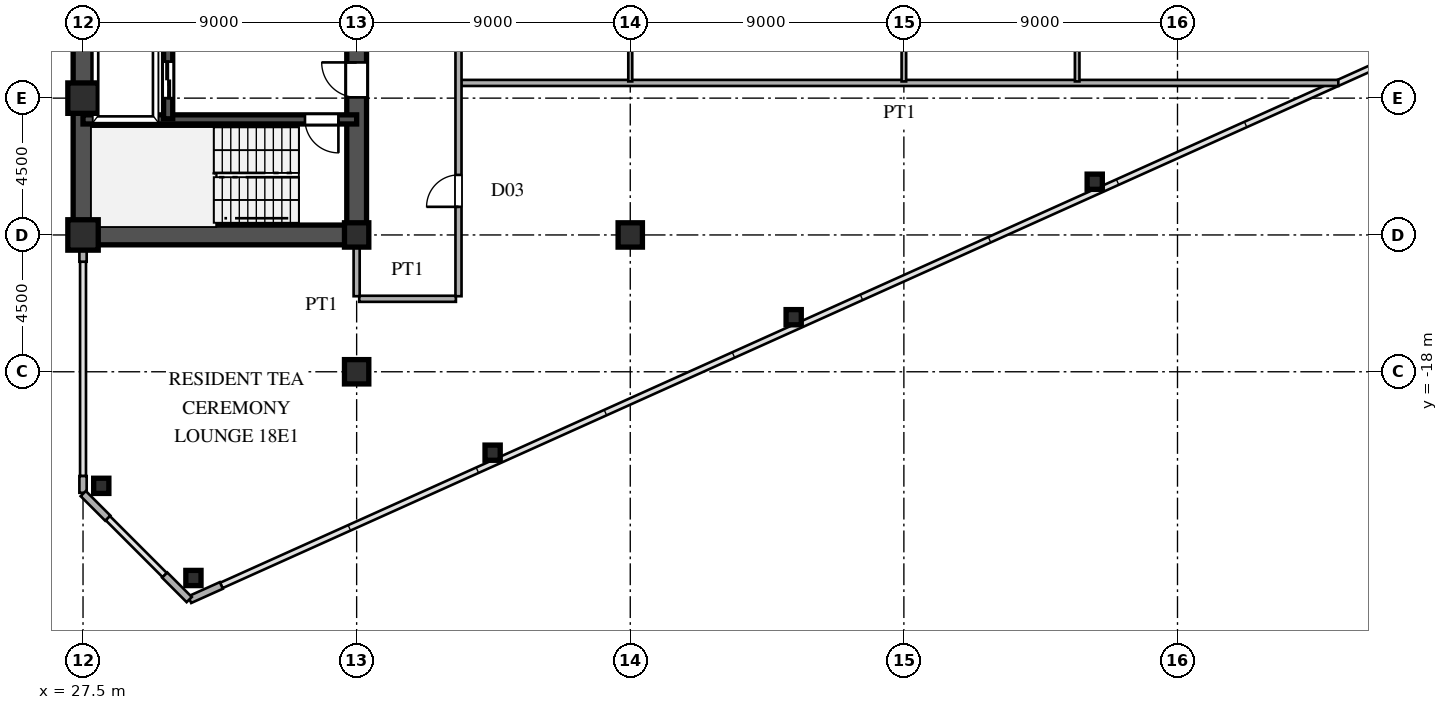
"""IFC4 building model, lengths in metres.
Left out: names, types, materials, properties, quantities, classifications, styles, units other than length and angle.
Written with IfcOpenShell. Run it as: python <this file> out.ifc"""

import sys

from ifc_helpers import new_model, si_unit, direction, frame, frame_2d, origin, origin_2d, place, context, subcontext, project, spatial, rectangle, hollow_rectangle, i_section, extrude, source, transform, mapped, element, fill, save


model = new_model("IFC4")
c1 = context("Model", 3, precision=1e-05, world=origin(), true_north=direction((0.0, 1.0)))
c2 = subcontext(c1, "Body", "Model", "MODEL_VIEW")
j1 = project(units=[si_unit("LENGTHUNIT", "METRE"), si_unit("PLANEANGLEUNIT", "RADIAN")], contexts=[c1])
p1 = place(None, origin())
s1 = spatial("IfcSite", under=j1, at=p1, CompositionType="ELEMENT")
p2 = place(p1, origin())
s2 = spatial("IfcBuilding", under=s1, at=p2, CompositionType="ELEMENT")
p3 = place(p2, frame((0.0, 0.0, 69.3)))
s3 = spatial("IfcBuildingStorey", under=s2, at=p3, CompositionType="ELEMENT", Elevation=69.3)
m1 = source(origin(), c2, "Body", "SweptSolid", [
    extrude(hollow_rectangle(XDim=1.0, YDim=1.0, WallThickness=0.042, at=origin_2d()), origin(), (0.0, 0.0, 1.0), 3.6),
])
for number, where, z_axis, x_axis in (
    (1, (27.5, -13.5, 0.0), (0.0, 0.0, 1.0), (1.0, 0.0, 0.0)),
    (2, (27.5, -9.0, 0.0), (0.0, 0.0, 1.0), (1.0, 0.0, 0.0)),
):
    element("IfcColumn", number, at=place(p3, frame(where, z_axis=z_axis, x_axis=x_axis)), inside=s3, PredefinedType="COLUMN", context=c2, shape_type="MappedRepresentation", body=[
        mapped(m1, transform((0.0, 0.0, 0.0), scale=1.0)),
    ])
m2 = source(origin(), c2, "Body", "SweptSolid", [
    extrude(i_section(OverallWidth=0.8, OverallDepth=0.8, WebThickness=0.032, FlangeThickness=0.05, at=origin_2d()), origin(), (0.0, 0.0, 1.0), 3.6),
])
for number, where, z_axis, x_axis in (
    (3, (36.5, -18.0, 0.0), (0.0, 0.0, 1.0), (1.0, 0.0, 0.0)),
    (4, (36.5, -13.5, 0.0), (0.0, 0.0, 1.0), (1.0, 0.0, 0.0)),
    (5, (45.5, -13.5, 0.0), (0.0, 0.0, 1.0), (1.0, 0.0, 0.0)),
):
    element("IfcColumn", number, at=place(p3, frame(where, z_axis=z_axis, x_axis=x_axis)), inside=s3, PredefinedType="COLUMN", context=c2, shape_type="MappedRepresentation", body=[
        mapped(m2, transform((0.0, 0.0, 0.0), scale=1.0)),
    ])
m3 = source(origin(), c2, "Body", "SweptSolid", [
    extrude(hollow_rectangle(XDim=0.5, YDim=0.5, WallThickness=0.02, at=origin_2d()), origin(), (0.0, 0.0, 1.0), 3.6),
])
for number, where, z_axis, x_axis in (
    (6, (31.131, -24.783, 0.0), (0.0, 0.0, 1.0), (1.0, 0.0, 0.0)),
    (7, (28.1, -21.751, 0.0), (0.0, 0.0, 1.0), (1.0, 0.0, 0.0)),
    (8, (40.973, -20.661, 0.0), (0.0, 0.0, 1.0), (1.0, 0.0, 0.0)),
    (9, (50.875, -16.205, 0.0), (0.0, 0.0, 1.0), (1.0, 0.0, 0.0)),
    (10, (60.778, -11.749, 0.0), (0.0, 0.0, 1.0), (1.0, 0.0, 0.0)),
):
    element("IfcColumn", number, at=place(p3, frame(where, z_axis=z_axis, x_axis=x_axis)), inside=s3, PredefinedType="COLUMN", context=c2, shape_type="MappedRepresentation", body=[
        mapped(m3, transform((0.0, 0.0, 0.0), scale=1.0)),
    ])
p4 = place(p3, frame((31.009, -25.496, 0.0), z_axis=(0.0, 0.0, 1.0), x_axis=(0.911929519623, 0.410346866979, 0.0)))
e11 = element("IfcWall", 11, at=p4, inside=s3, PredefinedType="SOLIDWALL", context=c2, shape_type="SweptSolid", body=[
    extrude(rectangle(XDim=1.14, YDim=0.24, at=frame_2d((0.57, 0.0))), origin(), (0.0, 0.0, 1.0), 3.38),
])
p5 = place(p3, frame((27.5, -21.98, 0.0), z_axis=(0.0, 0.0, 1.0), x_axis=(0.0, 1.0, 0.0)))
e12 = element("IfcWall", 12, at=p5, inside=s3, PredefinedType="SOLIDWALL", context=c2, shape_type="SweptSolid", body=[
    extrude(rectangle(XDim=0.55, YDim=0.24, at=frame_2d((0.275, 0.0))), origin(), (0.0, 0.0, 1.0), 3.38),
])
p6 = place(p3, frame((27.5, -14.38, 0.0), z_axis=(0.0, 0.0, 1.0), x_axis=(0.0, 1.0, 0.0)))
e13 = element("IfcWall", 13, at=p6, inside=s3, PredefinedType="SOLIDWALL", context=c2, shape_type="SweptSolid", body=[
    extrude(rectangle(XDim=0.55, YDim=0.24, at=frame_2d((0.275, 0.0))), origin(), (0.0, 0.0, 1.0), 2.88),
])
for number, where, z_axis, x_axis in (
    (14, (27.507, -22.007, 0.0), (0.0, 0.0, 1.0), (0.707, -0.707, 0.0)),
    (15, (30.187, -24.687, 0.0), (0.0, 0.0, 1.0), (0.707, -0.707, 0.0)),
):
    element("IfcWall", number, at=place(p3, frame(where, z_axis=z_axis, x_axis=x_axis)), inside=s3, PredefinedType="SOLIDWALL", context=c2, shape_type="SweptSolid", body=[
        extrude(rectangle(XDim=1.14, YDim=0.24, at=frame_2d((0.57, 0.0))), origin(), (0.0, 0.0, 1.0), 3.38),
    ])
p7 = place(p3, frame((27.5, -13.5, 0.0), z_axis=(0.0, 0.0, 1.0), x_axis=(0.0, 1.0, 0.0)))
e16 = element("IfcWall", 16, at=p7, inside=s3, PredefinedType="SHEAR", context=c2, shape_type="SweptSolid", body=[
    extrude(rectangle(XDim=12.2, YDim=0.65, at=frame_2d((6.1, 0.0))), origin(), (0.0, 0.0, 1.0), 3.38),
])
p8 = place(p3, frame((27.5, -13.5, 0.0), z_axis=(0.0, 0.0, 1.0), x_axis=(1.0, 0.0, 0.0)))
e17 = element("IfcWall", 17, at=p8, inside=s3, PredefinedType="SHEAR", context=c2, shape_type="SweptSolid", body=[
    extrude(rectangle(XDim=9.0, YDim=0.65, at=frame_2d((4.5, 0.0))), origin(), (0.0, 0.0, 1.0), 3.38),
])
p9 = place(p3, frame((36.5, -13.65, 0.0), z_axis=(0.0, 0.0, 1.0), x_axis=(0.0, 1.0, 0.0)))
e18 = element("IfcWall", 18, at=p9, inside=s3, PredefinedType="SHEAR", context=c2, shape_type="SweptSolid", body=[
    extrude(rectangle(XDim=7.15, YDim=0.65, at=frame_2d((3.575, 0.0))), origin(), (0.0, 0.0, 1.0), 3.38),
])
p10 = place(p9, frame((4.675, 0.0, 0.0)))
e19 = element("IfcOpeningElement", 19, at=p10, cuts=e18, PredefinedType="OPENING", context=c2, shape_type="SweptSolid", body=[
    extrude(rectangle(XDim=1.15, YDim=2.2, at=frame_2d((0.575, 1.1))), frame((0.0, 0.335, 0.0), z_axis=(0.0, -1.0, 0.0), x_axis=(1.0, 0.0, 0.0)), (0.0, 0.0, 1.0), 0.67),
])
p11 = place(p3, frame((27.5, -9.7, 0.0), z_axis=(0.0, 0.0, 1.0), x_axis=(1.0, 0.0, 0.0)))
e20 = element("IfcWall", 20, at=p11, inside=s3, PredefinedType="SHEAR", context=c2, shape_type="SweptSolid", body=[
    extrude(rectangle(XDim=9.0, YDim=0.3, at=frame_2d((4.5, 0.0))), origin(), (0.0, 0.0, 1.0), 3.38),
])
p12 = place(p11, frame((7.3, 0.0, 0.0)))
e21 = element("IfcOpeningElement", 21, at=p12, cuts=e20, PredefinedType="OPENING", context=c2, shape_type="SweptSolid", body=[
    extrude(rectangle(XDim=1.1, YDim=2.2, at=frame_2d((0.55, 1.1))), frame((0.0, 0.16, 0.0), z_axis=(0.0, -1.0, 0.0), x_axis=(1.0, 0.0, 0.0)), (0.0, 0.0, 1.0), 0.32),
])
p13 = place(p3, frame((30.3, -9.68, 0.0), z_axis=(0.0, 0.0, 1.0), x_axis=(0.0, 1.0, 0.0)))
e22 = element("IfcWall", 22, at=p13, inside=s3, PredefinedType="SHEAR", context=c2, shape_type="SweptSolid", body=[
    extrude(rectangle(XDim=2.56, YDim=0.3, at=frame_2d((1.28, 0.0))), origin(), (0.0, 0.0, 1.0), 3.38),
])
p14 = place(p13, frame((0.68, 0.0, 0.0)))
e23 = element("IfcOpeningElement", 23, at=p14, cuts=e22, PredefinedType="OPENING", context=c2, shape_type="SweptSolid", body=[
    extrude(rectangle(XDim=1.2, YDim=2.25, at=frame_2d((0.6, 1.125))), frame((0.0, 0.16, 0.0), z_axis=(0.0, -1.0, 0.0), x_axis=(1.0, 0.0, 0.0)), (0.0, 0.0, 1.0), 0.32),
])
p15 = place(p3, frame((36.585, -15.6, 0.0), z_axis=(0.0, 0.0, 1.0), x_axis=(1.0, 0.0, 0.0)))
e24 = element("IfcWall", 24, at=p15, inside=s3, PredefinedType="PARTITIONING", context=c2, shape_type="SweptSolid", body=[
    extrude(rectangle(XDim=3.18, YDim=0.2, at=frame_2d((1.59, 0.0))), origin(), (0.0, 0.0, 1.0), 3.38),
])
p16 = place(p3, frame((39.93, -8.5, 0.0), z_axis=(0.0, 0.0, 1.0), x_axis=(1.0, 0.0, 0.0)))
e25 = element("IfcWall", 25, at=p16, inside=s3, PredefinedType="PARTITIONING", context=c2, shape_type="SweptSolid", body=[
    extrude(rectangle(XDim=28.86, YDim=0.2, at=frame_2d((14.43, 0.0))), origin(), (0.0, 0.0, 1.0), 3.38),
])
p17 = place(p3, frame((36.5, -15.515, 0.0), z_axis=(0.0, 0.0, 1.0), x_axis=(0.0, 1.0, 0.0)))
e26 = element("IfcWall", 26, at=p17, inside=s3, PredefinedType="PARTITIONING", context=c2, shape_type="SweptSolid", body=[
    extrude(rectangle(XDim=1.685, YDim=0.2, at=frame_2d((0.842, 0.0))), origin(), (0.0, 0.0, 1.0), 2.68),
])
p18 = place(p3, frame((39.85, -15.515, 0.0), z_axis=(0.0, 0.0, 1.0), x_axis=(0.0, 1.0, 0.0)))
e27 = element("IfcWall", 27, at=p18, inside=s3, PredefinedType="PARTITIONING", context=c2, shape_type="SweptSolid", body=[
    extrude(rectangle(XDim=31.03, YDim=0.2, at=frame_2d((15.515, 0.0))), origin(), (0.0, 0.0, 1.0), 3.38),
])
p19 = place(p18, frame((2.94, 0.0, 0.0)))
e28 = element("IfcOpeningElement", 28, at=p19, cuts=e27, PredefinedType="OPENING", context=c2, shape_type="SweptSolid", body=[
    extrude(rectangle(XDim=1.05, YDim=2.25, at=frame_2d((0.525, 1.125))), frame((0.0, 0.11, 0.0), z_axis=(0.0, -1.0, 0.0), x_axis=(1.0, 0.0, 0.0)), (0.0, 0.0, 1.0), 0.22),
])
p20 = place(p18, frame((13.28, 0.0, 0.0)))
e29 = element("IfcOpeningElement", 29, at=p20, cuts=e27, PredefinedType="OPENING", context=c2, shape_type="SweptSolid", body=[
    extrude(rectangle(XDim=1.05, YDim=2.25, at=frame_2d((0.525, 1.125))), frame((0.0, 0.11, 0.0), z_axis=(0.0, -1.0, 0.0), x_axis=(1.0, 0.0, 0.0)), (0.0, 0.0, 1.0), 0.22),
])
p21 = place(p18, frame((25.567, 0.0, 0.0)))
e30 = element("IfcOpeningElement", 30, at=p21, cuts=e27, PredefinedType="OPENING", context=c2, shape_type="SweptSolid", body=[
    extrude(rectangle(XDim=1.05, YDim=2.25, at=frame_2d((0.525, 1.125))), frame((0.0, 0.11, 0.0), z_axis=(0.0, -1.0, 0.0), x_axis=(1.0, 0.0, 0.0)), (0.0, 0.0, 1.0), 0.22),
])
p22 = place(p3, frame((45.5, -8.45, 0.0), z_axis=(0.0, 0.0, 1.0), x_axis=(0.0, 1.0, 0.0)))
e31 = element("IfcWall", 31, at=p22, inside=s3, PredefinedType="PARTITIONING", context=c2, shape_type="SweptSolid", body=[
    extrude(rectangle(XDim=9.233, YDim=0.13, at=frame_2d((4.616, 0.0))), origin(), (0.0, 0.0, 1.0), 2.68),
])
p23 = place(p22, frame((6.475, 0.0, 0.0)))
e32 = element("IfcOpeningElement", 32, at=p23, cuts=e31, PredefinedType="OPENING", context=c2, shape_type="SweptSolid", body=[
    extrude(rectangle(XDim=0.95, YDim=2.15, at=frame_2d((0.475, 1.075))), frame((0.0, 0.075, 0.0), z_axis=(0.0, -1.0, 0.0), x_axis=(1.0, 0.0, 0.0)), (0.0, 0.0, 1.0), 0.15),
])
p24 = place(p3, frame((54.5, -8.45, 0.0), z_axis=(0.0, 0.0, 1.0), x_axis=(0.0, 1.0, 0.0)))
e33 = element("IfcWall", 33, at=p24, inside=s3, PredefinedType="PARTITIONING", context=c2, shape_type="SweptSolid", body=[
    extrude(rectangle(XDim=22.883, YDim=0.15, at=frame_2d((11.441, 0.0))), origin(), (0.0, 0.0, 1.0), 2.68),
])
p25 = place(p24, frame((6.475, 0.0, 0.0)))
e34 = element("IfcOpeningElement", 34, at=p25, cuts=e33, PredefinedType="OPENING", context=c2, shape_type="SweptSolid", body=[
    extrude(rectangle(XDim=0.95, YDim=2.15, at=frame_2d((0.475, 1.075))), frame((0.0, 0.085, 0.0), z_axis=(0.0, -1.0, 0.0), x_axis=(1.0, 0.0, 0.0)), (0.0, 0.0, 1.0), 0.17),
])
p26 = place(p24, frame((20.212, 0.0, 0.0)))
e35 = element("IfcOpeningElement", 35, at=p26, cuts=e33, PredefinedType="OPENING", context=c2, shape_type="SweptSolid", body=[
    extrude(rectangle(XDim=0.95, YDim=2.15, at=frame_2d((0.475, 1.075))), frame((0.0, 0.085, 0.0), z_axis=(0.0, -1.0, 0.0), x_axis=(1.0, 0.0, 0.0)), (0.0, 0.0, 1.0), 0.17),
])
p27 = place(p24, frame((15.721, 0.0, 0.0)))
e36 = element("IfcOpeningElement", 36, at=p27, cuts=e33, PredefinedType="OPENING", context=c2, shape_type="SweptSolid", body=[
    extrude(rectangle(XDim=0.95, YDim=2.15, at=frame_2d((0.475, 1.075))), frame((0.0, 0.085, 0.0), z_axis=(0.0, -1.0, 0.0), x_axis=(1.0, 0.0, 0.0)), (0.0, 0.0, 1.0), 0.17),
])
p28 = place(p3, frame((60.2, -8.45, 0.0), z_axis=(0.0, 0.0, 1.0), x_axis=(0.0, 1.0, 0.0)))
e37 = element("IfcWall", 37, at=p28, inside=s3, PredefinedType="PARTITIONING", context=c2, shape_type="SweptSolid", body=[
    extrude(rectangle(XDim=18.392, YDim=0.15, at=frame_2d((9.196, 0.0))), origin(), (0.0, 0.0, 1.0), 3.38),
])
p29 = place(p28, frame((1.808, 0.0, 0.0)))
e38 = element("IfcOpeningElement", 38, at=p29, cuts=e37, PredefinedType="OPENING", context=c2, shape_type="SweptSolid", body=[
    extrude(rectangle(XDim=0.95, YDim=2.15, at=frame_2d((0.475, 1.075))), frame((0.0, 0.085, 0.0), z_axis=(0.0, -1.0, 0.0), x_axis=(1.0, 0.0, 0.0)), (0.0, 0.0, 1.0), 0.17),
])
p30 = place(p28, frame((6.475, 0.0, 0.0)))
e39 = element("IfcOpeningElement", 39, at=p30, cuts=e37, PredefinedType="OPENING", context=c2, shape_type="SweptSolid", body=[
    extrude(rectangle(XDim=0.95, YDim=2.15, at=frame_2d((0.475, 1.075))), frame((0.0, 0.085, 0.0), z_axis=(0.0, -1.0, 0.0), x_axis=(1.0, 0.0, 0.0)), (0.0, 0.0, 1.0), 0.17),
])
p31 = place(p28, frame((11.142, 0.0, 0.0)))
e40 = element("IfcOpeningElement", 40, at=p31, cuts=e37, PredefinedType="OPENING", context=c2, shape_type="SweptSolid", body=[
    extrude(rectangle(XDim=0.95, YDim=2.15, at=frame_2d((0.475, 1.075))), frame((0.0, 0.085, 0.0), z_axis=(0.0, -1.0, 0.0), x_axis=(1.0, 0.0, 0.0)), (0.0, 0.0, 1.0), 0.17),
])
p32 = place(p28, frame((15.721, 0.0, 0.0)))
e41 = element("IfcOpeningElement", 41, at=p32, cuts=e37, PredefinedType="OPENING", context=c2, shape_type="SweptSolid", body=[
    extrude(rectangle(XDim=0.95, YDim=2.15, at=frame_2d((0.475, 1.075))), frame((0.0, 0.085, 0.0), z_axis=(0.0, -1.0, 0.0), x_axis=(1.0, 0.0, 0.0)), (0.0, 0.0, 1.0), 0.17),
])
m4 = source(origin(), c2, "Body", "SweptSolid", [
    extrude(rectangle(XDim=1.15, YDim=2.2, at=frame_2d((0.575, 1.1))), frame((0.0, 0.025, 0.0), z_axis=(0.0, -1.0, 0.0), x_axis=(1.0, 0.0, 0.0)), (0.0, 0.0, 1.0), 0.05),
])
p33 = place(p10, origin())
e42 = element("IfcDoor", 42, at=p33, inside=s3, OperationType="SINGLE_SWING_RIGHT", PredefinedType="DOOR", context=c2, shape_type="MappedRepresentation", body=[
    mapped(m4, transform((0.0, 0.0, 0.0), scale=1.0)),
])
fill(e19, e42)
m5 = source(origin(), c2, "Body", "SweptSolid", [
    extrude(rectangle(XDim=1.1, YDim=2.2, at=frame_2d((0.55, 1.1))), frame((0.0, 0.025, 0.0), z_axis=(0.0, -1.0, 0.0), x_axis=(1.0, 0.0, 0.0)), (0.0, 0.0, 1.0), 0.05),
])
p34 = place(p12, frame((1.1, 0.0, 0.0), z_axis=(0.0, 0.0, 1.0), x_axis=(-1.0, 0.0, 0.0)))
e43 = element("IfcDoor", 43, at=p34, inside=s3, OperationType="SINGLE_SWING_RIGHT", PredefinedType="DOOR", context=c2, shape_type="MappedRepresentation", body=[
    mapped(m5, transform((0.0, 0.0, 0.0), scale=1.0)),
])
fill(e21, e43)
m6 = source(origin(), c2, "Body", "SweptSolid", [
    extrude(rectangle(XDim=1.2, YDim=2.25, at=frame_2d((0.6, 1.125))), frame((0.0, 0.025, 0.0), z_axis=(0.0, -1.0, 0.0), x_axis=(1.0, 0.0, 0.0)), (0.0, 0.0, 1.0), 0.05),
])
p35 = place(p14, origin())
e44 = element("IfcDoor", 44, at=p35, inside=s3, OperationType="DOUBLE_DOOR_SLIDING", PredefinedType="DOOR", context=c2, shape_type="MappedRepresentation", body=[
    mapped(m6, transform((0.0, 0.0, 0.0), scale=1.0)),
])
fill(e23, e44)
m7 = source(origin(), c2, "Body", "SweptSolid", [
    extrude(rectangle(XDim=1.05, YDim=2.25, at=frame_2d((0.525, 1.125))), frame((0.0, 0.025, 0.0), z_axis=(0.0, -1.0, 0.0), x_axis=(1.0, 0.0, 0.0)), (0.0, 0.0, 1.0), 0.05),
])
p36 = place(p19, origin())
e45 = element("IfcDoor", 45, at=p36, inside=s3, OperationType="SINGLE_SWING_LEFT", PredefinedType="DOOR", context=c2, shape_type="MappedRepresentation", body=[
    mapped(m7, transform((0.0, 0.0, 0.0), scale=1.0)),
])
fill(e28, e45)
save(model, sys.argv[1])
